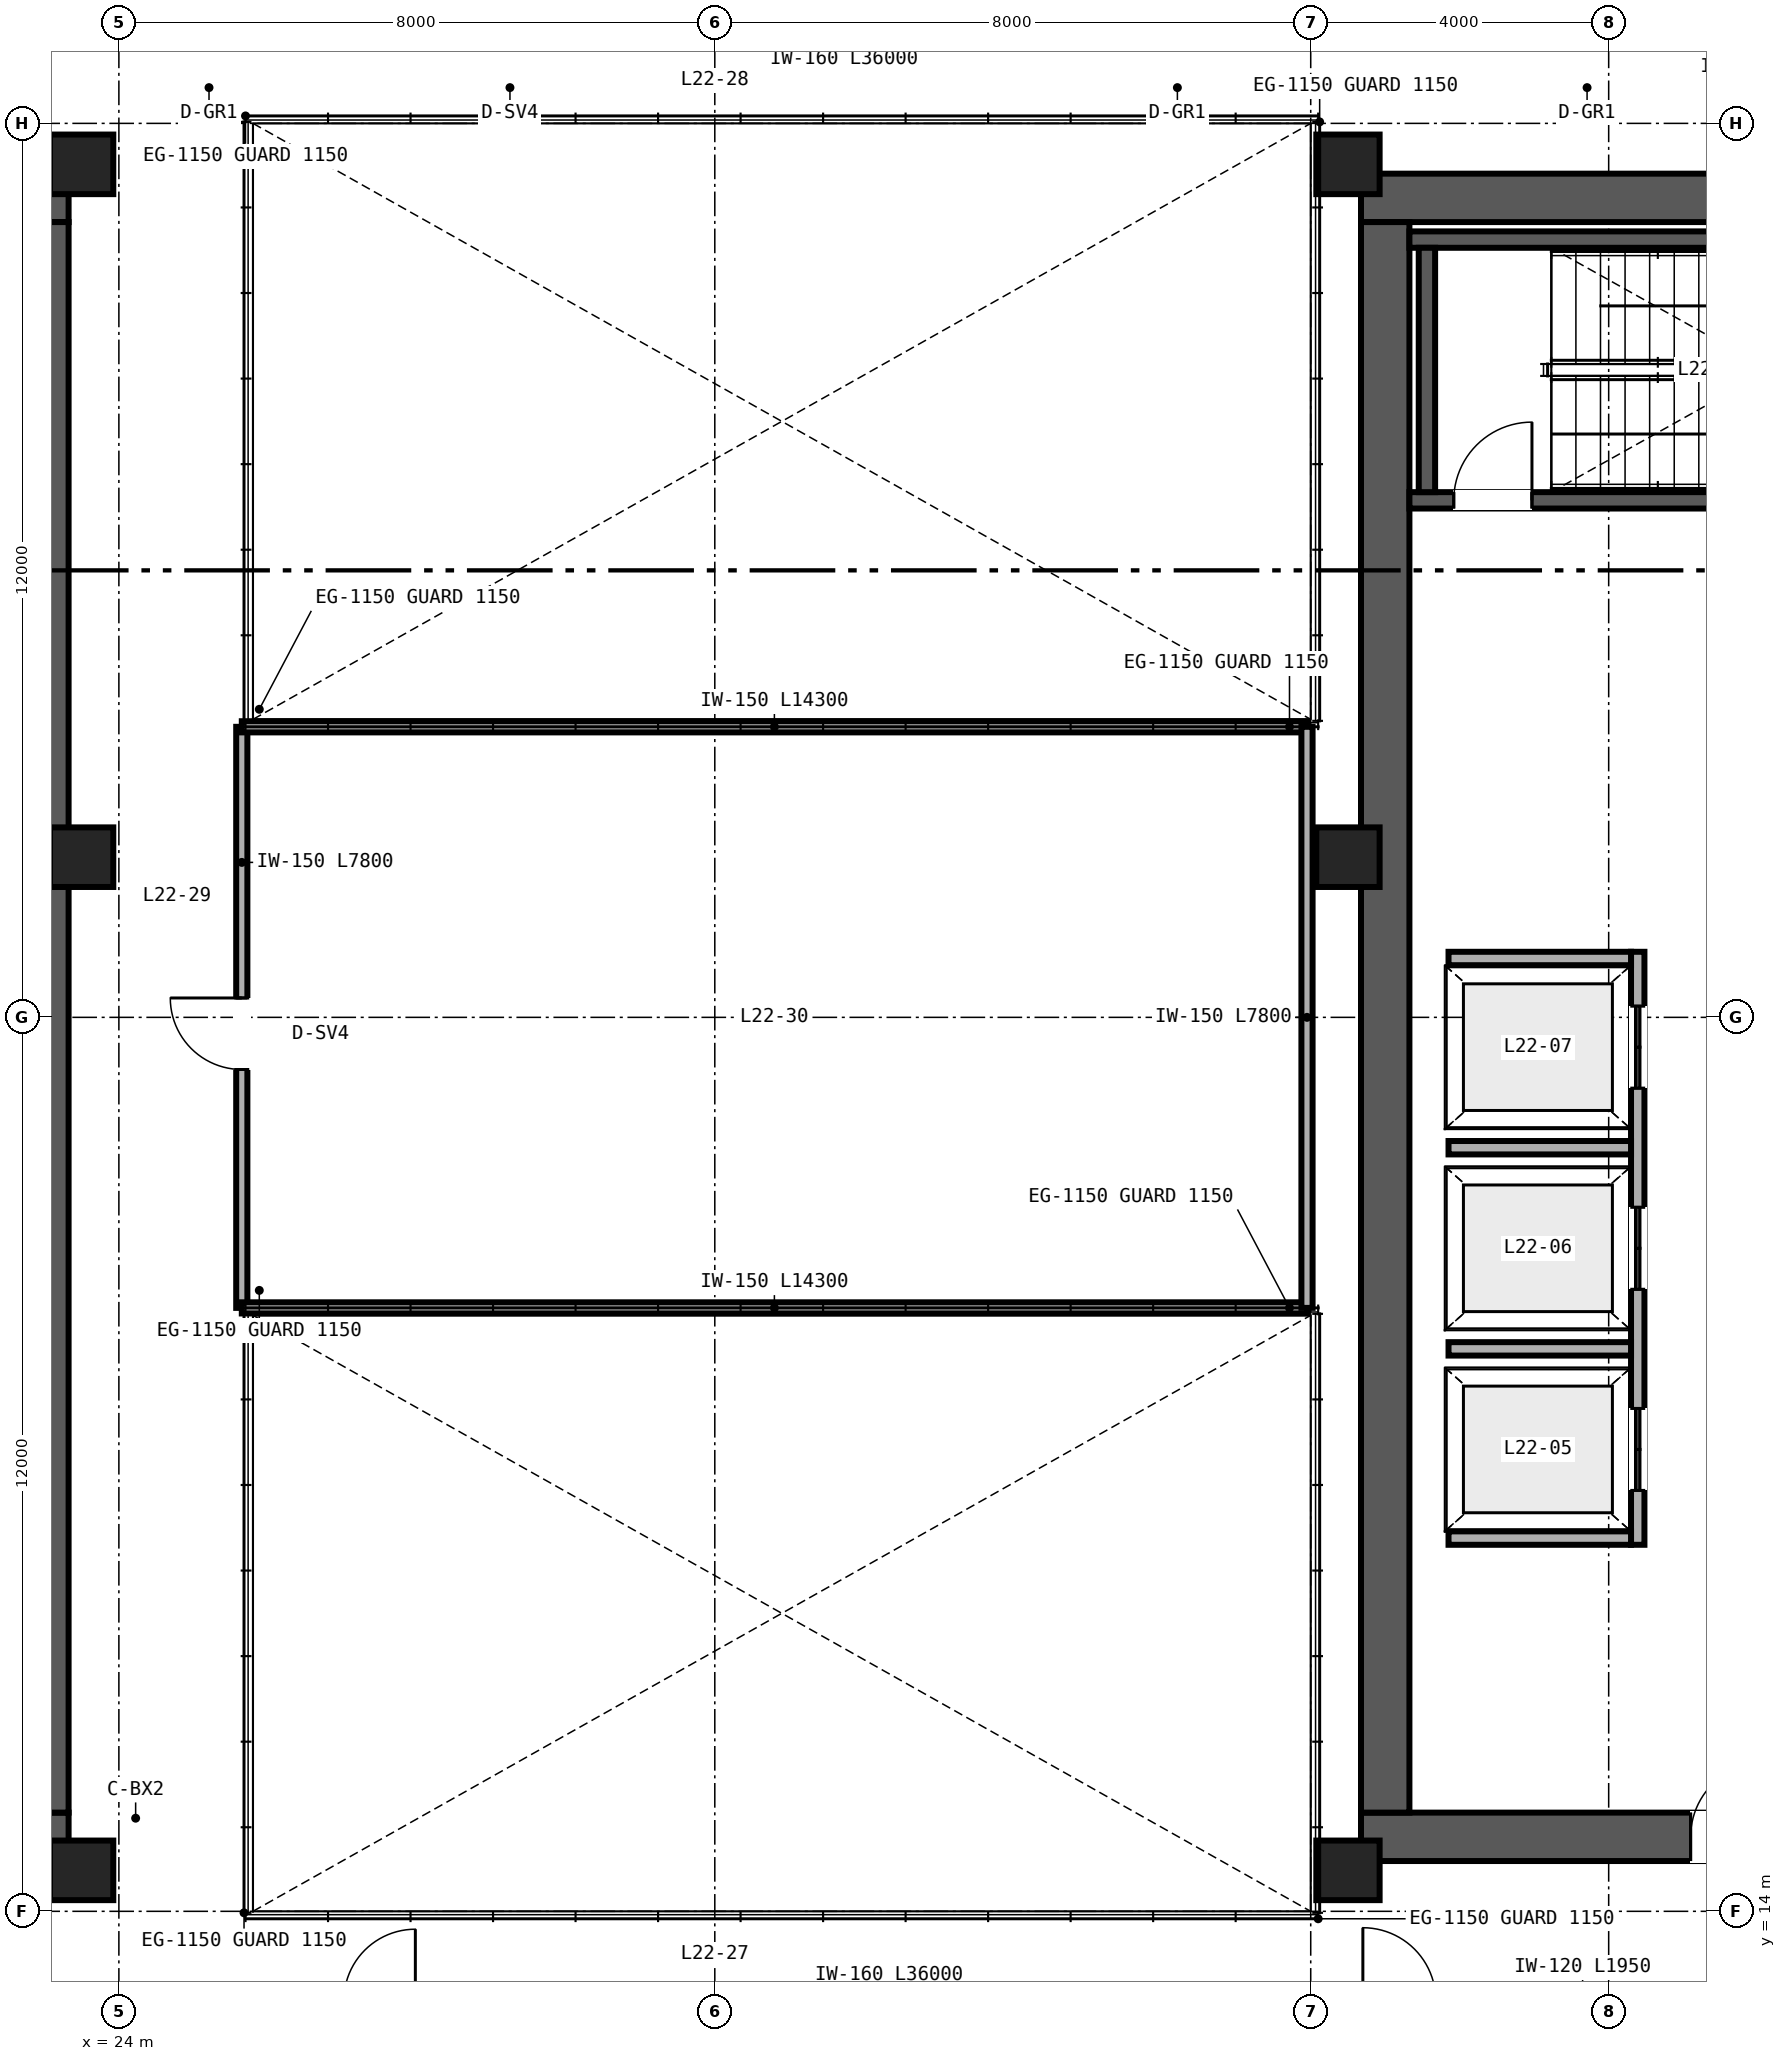
"""IFC4 building model, lengths in metres.
Left out: names, types, materials, properties, quantities, classifications, styles, units other than length and angle.
Written with IfcOpenShell. Run it as: python <this file> out.ifc"""

import sys

from ifc_helpers import new_model, si_unit, direction, frame, frame_2d, origin, origin_2d, place, context, subcontext, project, spatial, rectangle, hollow_rectangle, extrude, source, transform, mapped, element, fill, save


model = new_model("IFC4")
c1 = context("Model", 3, precision=1e-05, world=origin(), true_north=direction((0.0, 1.0)))
c2 = subcontext(c1, "Body", "Model", "MODEL_VIEW")
j1 = project(units=[si_unit("LENGTHUNIT", "METRE"), si_unit("PLANEANGLEUNIT", "RADIAN")], contexts=[c1])
p1 = place(None, origin())
s1 = spatial("IfcSite", under=j1, at=p1, CompositionType="ELEMENT")
p2 = place(p1, origin())
s2 = spatial("IfcBuilding", under=s1, at=p2, CompositionType="ELEMENT")
p3 = place(p2, frame((0.0, 0.0, 92.4)))
s3 = spatial("IfcBuildingStorey", under=s2, at=p3, CompositionType="ELEMENT", Elevation=92.4)
p4 = place(p3, frame((10.675, 15.0, 0.0), z_axis=(0.0, 0.0, 1.0), x_axis=(1.0, 0.0, 0.0)))
e1 = element("IfcWall", 1, at=p4, inside=s3, PredefinedType="SHEAR", context=c2, shape_type="SweptSolid", body=[
    extrude(rectangle(XDim=12.65, YDim=0.65, at=frame_2d((6.325, 0.0))), origin(), (0.0, 0.0, 1.0), 4.56),
])
p5 = place(p4, frame((8.905, 0.0, 0.0)))
e2 = element("IfcOpeningElement", 2, at=p5, cuts=e1, PredefinedType="OPENING", context=c2, shape_type="SweptSolid", body=[
    extrude(rectangle(XDim=1.0, YDim=2.15, at=frame_2d((0.5, 1.075))), frame((0.0, 0.335, 0.0), z_axis=(0.0, -1.0, 0.0), x_axis=(1.0, 0.0, 0.0)), (0.0, 0.0, 1.0), 0.67),
])
p6 = place(p3, frame((10.675, 37.0, 0.0), z_axis=(0.0, 0.0, 1.0), x_axis=(1.0, 0.0, 0.0)))
e3 = element("IfcWall", 3, at=p6, inside=s3, PredefinedType="SHEAR", context=c2, shape_type="SweptSolid", body=[
    extrude(rectangle(XDim=12.65, YDim=0.65, at=frame_2d((6.325, 0.0))), origin(), (0.0, 0.0, 1.0), 4.56),
])
p7 = place(p6, frame((8.905, 0.0, 0.0)))
e4 = element("IfcOpeningElement", 4, at=p7, cuts=e3, PredefinedType="OPENING", context=c2, shape_type="SweptSolid", body=[
    extrude(rectangle(XDim=1.0, YDim=2.15, at=frame_2d((0.5, 1.075))), frame((0.0, 0.335, 0.0), z_axis=(0.0, -1.0, 0.0), x_axis=(1.0, 0.0, 0.0)), (0.0, 0.0, 1.0), 0.67),
])
p8 = place(p3, frame((23.0, 15.325, 0.0), z_axis=(0.0, 0.0, 1.0), x_axis=(0.0, 1.0, 0.0)))
e5 = element("IfcWall", 5, at=p8, inside=s3, PredefinedType="SHEAR", context=c2, shape_type="SweptSolid", body=[
    extrude(rectangle(XDim=21.35, YDim=0.65, at=frame_2d((10.675, 0.0))), origin(), (0.0, 0.0, 1.0), 4.56),
])
p9 = place(p3, frame((40.675, 15.0, 0.0), z_axis=(0.0, 0.0, 1.0), x_axis=(1.0, 0.0, 0.0)))
e6 = element("IfcWall", 6, at=p9, inside=s3, PredefinedType="SHEAR", context=c2, shape_type="SweptSolid", body=[
    extrude(rectangle(XDim=12.65, YDim=0.65, at=frame_2d((6.325, 0.0))), origin(), (0.0, 0.0, 1.0), 4.56),
])
p10 = place(p9, frame((4.425, 0.0, 0.0)))
e7 = element("IfcOpeningElement", 7, at=p10, cuts=e6, PredefinedType="OPENING", context=c2, shape_type="SweptSolid", body=[
    extrude(rectangle(XDim=1.0, YDim=2.15, at=frame_2d((0.5, 1.075))), frame((0.0, 0.335, 0.0), z_axis=(0.0, -1.0, 0.0), x_axis=(1.0, 0.0, 0.0)), (0.0, 0.0, 1.0), 0.67),
])
p11 = place(p3, frame((40.675, 37.0, 0.0), z_axis=(0.0, 0.0, 1.0), x_axis=(1.0, 0.0, 0.0)))
e8 = element("IfcWall", 8, at=p11, inside=s3, PredefinedType="SHEAR", context=c2, shape_type="SweptSolid", body=[
    extrude(rectangle(XDim=12.65, YDim=0.65, at=frame_2d((6.325, 0.0))), origin(), (0.0, 0.0, 1.0), 4.56),
])
p12 = place(p11, frame((10.025, 0.0, 0.0)))
e9 = element("IfcOpeningElement", 9, at=p12, cuts=e8, PredefinedType="OPENING", context=c2, shape_type="SweptSolid", body=[
    extrude(rectangle(XDim=1.1, YDim=2.15, at=frame_2d((0.55, 1.075))), frame((0.0, 0.335, 0.0), z_axis=(0.0, -1.0, 0.0), x_axis=(1.0, 0.0, 0.0)), (0.0, 0.0, 1.0), 0.67),
])
p13 = place(p3, frame((41.0, 15.325, 0.0), z_axis=(0.0, 0.0, 1.0), x_axis=(0.0, 1.0, 0.0)))
e10 = element("IfcWall", 10, at=p13, inside=s3, PredefinedType="SHEAR", context=c2, shape_type="SweptSolid", body=[
    extrude(rectangle(XDim=21.35, YDim=0.65, at=frame_2d((10.675, 0.0))), origin(), (0.0, 0.0, 1.0), 4.56),
])
p14 = place(p3, frame((41.325, 32.94, 0.0), z_axis=(0.0, 0.0, 1.0), x_axis=(1.0, 0.0, 0.0)))
e11 = element("IfcWall", 11, at=p14, inside=s3, PredefinedType="SHEAR", context=c2, shape_type="SweptSolid", body=[
    extrude(rectangle(XDim=7.985, YDim=0.22, at=frame_2d((3.993, 0.0))), origin(), (0.0, 0.0, 1.0), 4.6),
])
p15 = place(p14, frame((0.595, 0.0, 0.0)))
e12 = element("IfcOpeningElement", 12, at=p15, cuts=e11, PredefinedType="OPENING", context=c2, shape_type="SweptSolid", body=[
    extrude(rectangle(XDim=1.05, YDim=2.15, at=frame_2d((0.525, 1.075))), frame((0.0, 0.12, 0.0), z_axis=(0.0, -1.0, 0.0), x_axis=(1.0, 0.0, 0.0)), (0.0, 0.0, 1.0), 0.24),
])
p16 = place(p3, frame((41.325, 36.44, 0.0), z_axis=(0.0, 0.0, 1.0), x_axis=(1.0, 0.0, 0.0)))
e13 = element("IfcWall", 13, at=p16, inside=s3, PredefinedType="SHEAR", context=c2, shape_type="SweptSolid", body=[
    extrude(rectangle(XDim=7.985, YDim=0.22, at=frame_2d((3.993, 0.0))), origin(), (0.0, 0.0, 1.0), 4.6),
])
p17 = place(p3, frame((41.56, 33.05, 0.0), z_axis=(0.0, 0.0, 1.0), x_axis=(0.0, 1.0, 0.0)))
e14 = element("IfcWall", 14, at=p17, inside=s3, PredefinedType="SHEAR", context=c2, shape_type="SweptSolid", body=[
    extrude(rectangle(XDim=3.28, YDim=0.22, at=frame_2d((1.64, 0.0))), origin(), (0.0, 0.0, 1.0), 4.6),
])
m1 = source(origin(), c2, "Body", "SweptSolid", [
    extrude(hollow_rectangle(XDim=0.85, YDim=0.8, WallThickness=0.032, at=origin_2d()), origin(), (0.0, 0.0, 1.0), 4.56),
])
for number, where, z_axis, x_axis in (
    (15, (23.5, 14.55, 0.0), (0.0, 0.0, 1.0), (1.0, 0.0, 0.0)),
    (16, (40.5, 14.55, 0.0), (0.0, 0.0, 1.0), (1.0, 0.0, 0.0)),
    (17, (23.5, 28.15, 0.0), (0.0, 0.0, 1.0), (1.0, 0.0, 0.0)),
    (18, (40.5, 28.15, 0.0), (0.0, 0.0, 1.0), (1.0, 0.0, 0.0)),
    (19, (23.5, 37.45, 0.0), (0.0, 0.0, 1.0), (1.0, 0.0, 0.0)),
    (20, (40.5, 37.45, 0.0), (0.0, 0.0, 1.0), (1.0, 0.0, 0.0)),
):
    element("IfcColumn", number, at=place(p3, frame(where, z_axis=z_axis, x_axis=x_axis)), inside=s3, PredefinedType="COLUMN", context=c2, shape_type="MappedRepresentation", body=[
        mapped(m1, transform((0.0, 0.0, 0.0), scale=1.0)),
    ])
p18 = place(p3, frame((44.39, 18.92, 0.0), z_axis=(0.0, 0.0, 1.0), x_axis=(0.0, 1.0, 0.0)))
e21 = element("IfcWall", 21, at=p18, inside=s3, PredefinedType="SOLIDWALL", context=c2, shape_type="SweptSolid", body=[
    extrude(rectangle(XDim=7.96, YDim=0.18, at=frame_2d((3.98, 0.0))), origin(), (0.0, 0.0, 1.0), 4.56),
])
p19 = place(p18, frame((0.73, 0.0, 0.0)))
e22 = element("IfcOpeningElement", 22, at=p19, cuts=e21, PredefinedType="OPENING", context=c2, shape_type="SweptSolid", body=[
    extrude(rectangle(XDim=1.1, YDim=2.2, at=frame_2d((0.55, 1.1))), frame((0.0, 0.1, 0.0), z_axis=(0.0, -1.0, 0.0), x_axis=(1.0, 0.0, 0.0)), (0.0, 0.0, 1.0), 0.2),
])
p20 = place(p18, frame((3.43, 0.0, 0.0)))
e23 = element("IfcOpeningElement", 23, at=p20, cuts=e21, PredefinedType="OPENING", context=c2, shape_type="SweptSolid", body=[
    extrude(rectangle(XDim=1.1, YDim=2.2, at=frame_2d((0.55, 1.1))), frame((0.0, 0.1, 0.0), z_axis=(0.0, -1.0, 0.0), x_axis=(1.0, 0.0, 0.0)), (0.0, 0.0, 1.0), 0.2),
])
p21 = place(p18, frame((6.13, 0.0, 0.0)))
e24 = element("IfcOpeningElement", 24, at=p21, cuts=e21, PredefinedType="OPENING", context=c2, shape_type="SweptSolid", body=[
    extrude(rectangle(XDim=1.1, YDim=2.2, at=frame_2d((0.55, 1.1))), frame((0.0, 0.1, 0.0), z_axis=(0.0, -1.0, 0.0), x_axis=(1.0, 0.0, 0.0)), (0.0, 0.0, 1.0), 0.2),
])
for number, where, z_axis, x_axis in (
    (25, (41.85, 19.01, 0.0), (0.0, 0.0, 1.0), (1.0, 0.0, 0.0)),
    (26, (41.85, 26.79, 0.0), (0.0, 0.0, 1.0), (1.0, 0.0, 0.0)),
    (27, (41.85, 21.55, 0.0), (0.0, 0.0, 1.0), (1.0, 0.0, 0.0)),
    (28, (41.85, 24.25, 0.0), (0.0, 0.0, 1.0), (1.0, 0.0, 0.0)),
):
    element("IfcWall", number, at=place(p3, frame(where, z_axis=z_axis, x_axis=x_axis)), inside=s3, PredefinedType="SOLIDWALL", context=c2, shape_type="SweptSolid", body=[
        extrude(rectangle(XDim=2.45, YDim=0.18, at=frame_2d((1.225, 0.0))), origin(), (0.0, 0.0, 1.0), 4.56),
    ])
p22 = place(p3, frame((25.65, 22.1, 0.0), z_axis=(0.0, 0.0, 1.0), x_axis=(0.0, 1.0, 0.0)))
e29 = element("IfcWall", 29, at=p22, inside=s3, PredefinedType="PARTITIONING", context=c2, shape_type="SweptSolid", body=[
    extrude(rectangle(XDim=7.8, YDim=0.15, at=frame_2d((3.9, 0.0))), origin(), (0.0, 0.0, 1.0), 3.633),
])
p23 = place(p22, frame((3.2, 0.0, 0.0)))
e30 = element("IfcOpeningElement", 30, at=p23, cuts=e29, PredefinedType="OPENING", context=c2, shape_type="SweptSolid", body=[
    extrude(rectangle(XDim=0.96, YDim=2.15, at=frame_2d((0.48, 1.075))), frame((0.0, 0.085, 0.0), z_axis=(0.0, -1.0, 0.0), x_axis=(1.0, 0.0, 0.0)), (0.0, 0.0, 1.0), 0.17),
])
for number, where, z_axis, x_axis in (
    (31, (25.65, 22.1, 0.0), (0.0, 0.0, 1.0), (1.0, 0.0, 0.0)),
    (32, (25.65, 29.9, 0.0), (0.0, 0.0, 1.0), (1.0, 0.0, 0.0)),
):
    element("IfcWall", number, at=place(p3, frame(where, z_axis=z_axis, x_axis=x_axis)), inside=s3, PredefinedType="PARTITIONING", context=c2, shape_type="SweptSolid", body=[
        extrude(rectangle(XDim=14.3, YDim=0.15, at=frame_2d((7.15, 0.0))), origin(), (0.0, 0.0, 1.0), 4.56),
    ])
p24 = place(p3, frame((39.95, 22.1, 0.0), z_axis=(0.0, 0.0, 1.0), x_axis=(0.0, 1.0, 0.0)))
e33 = element("IfcWall", 33, at=p24, inside=s3, PredefinedType="PARTITIONING", context=c2, shape_type="SweptSolid", body=[
    extrude(rectangle(XDim=7.8, YDim=0.15, at=frame_2d((3.9, 0.0))), origin(), (0.0, 0.0, 1.0), 3.633),
])
m2 = source(origin(), c2, "Body", "SweptSolid", [
    extrude(rectangle(XDim=1.05, YDim=2.15, at=frame_2d((0.525, 1.075))), frame((0.0, 0.025, 0.0), z_axis=(0.0, -1.0, 0.0), x_axis=(1.0, 0.0, 0.0)), (0.0, 0.0, 1.0), 0.05),
])
p25 = place(p15, origin())
e34 = element("IfcDoor", 34, at=p25, inside=s3, OperationType="SINGLE_SWING_RIGHT", PredefinedType="DOOR", context=c2, shape_type="MappedRepresentation", body=[
    mapped(m2, transform((0.0, 0.0, 0.0), scale=1.0)),
])
fill(e12, e34)
m3 = source(origin(), c2, "Body", "SweptSolid", [
    extrude(rectangle(XDim=1.1, YDim=2.2, at=frame_2d((0.55, 1.1))), frame((0.0, 0.025, 0.0), z_axis=(0.0, -1.0, 0.0), x_axis=(1.0, 0.0, 0.0)), (0.0, 0.0, 1.0), 0.05),
])
p26 = place(p19, origin())
e35 = element("IfcDoor", 35, at=p26, inside=s3, OperationType="DOUBLE_DOOR_SLIDING", PredefinedType="DOOR", context=c2, shape_type="MappedRepresentation", body=[
    mapped(m3, transform((0.0, 0.0, 0.0), scale=1.0)),
])
fill(e22, e35)
p27 = place(p20, origin())
e36 = element("IfcDoor", 36, at=p27, inside=s3, OperationType="DOUBLE_DOOR_SLIDING", PredefinedType="DOOR", context=c2, shape_type="MappedRepresentation", body=[
    mapped(m3, transform((0.0, 0.0, 0.0), scale=1.0)),
])
fill(e23, e36)
p28 = place(p21, origin())
e37 = element("IfcDoor", 37, at=p28, inside=s3, OperationType="DOUBLE_DOOR_SLIDING", PredefinedType="DOOR", context=c2, shape_type="MappedRepresentation", body=[
    mapped(m3, transform((0.0, 0.0, 0.0), scale=1.0)),
])
fill(e24, e37)
m4 = source(origin(), c2, "Body", "SweptSolid", [
    extrude(rectangle(XDim=1.0, YDim=2.15, at=frame_2d((0.5, 1.075))), frame((0.0, 0.025, 0.0), z_axis=(0.0, -1.0, 0.0), x_axis=(1.0, 0.0, 0.0)), (0.0, 0.0, 1.0), 0.05),
])
p29 = place(p10, origin())
e38 = element("IfcDoor", 38, at=p29, inside=s3, OperationType="SINGLE_SWING_RIGHT", PredefinedType="DOOR", context=c2, shape_type="MappedRepresentation", body=[
    mapped(m4, transform((0.0, 0.0, 0.0), scale=1.0)),
])
fill(e7, e38)
m5 = source(origin(), c2, "Body", "SweptSolid", [
    extrude(rectangle(XDim=0.96, YDim=2.15, at=frame_2d((0.48, 1.075))), frame((0.0, 0.025, 0.0), z_axis=(0.0, -1.0, 0.0), x_axis=(1.0, 0.0, 0.0)), (0.0, 0.0, 1.0), 0.05),
])
p30 = place(p23, origin())
e39 = element("IfcDoor", 39, at=p30, inside=s3, OperationType="SINGLE_SWING_RIGHT", PredefinedType="DOOR", context=c2, shape_type="MappedRepresentation", body=[
    mapped(m5, transform((0.0, 0.0, 0.0), scale=1.0)),
])
fill(e30, e39)
save(model, sys.argv[1])
